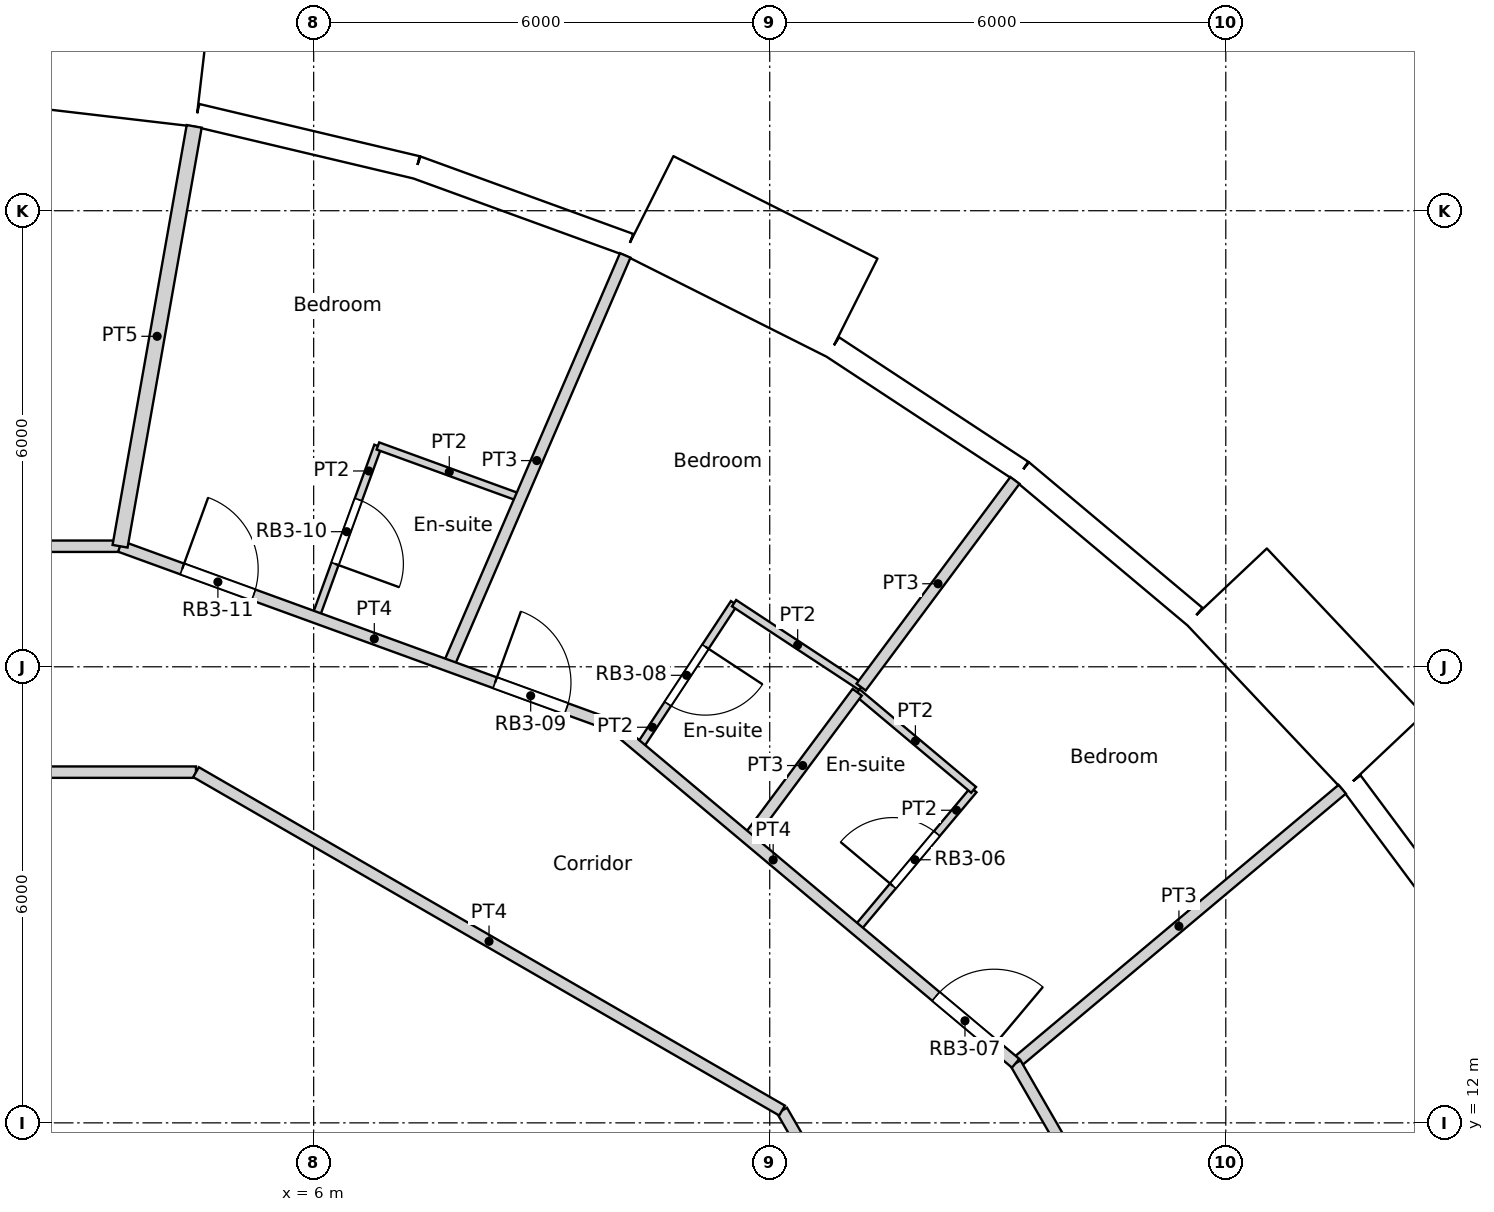
"""IFC4 building model, lengths in metres.
Left out: names, types, materials, properties, quantities, classifications, styles, units other than length and angle.
Written with IfcOpenShell. Run it as: python <this file> out.ifc"""

import sys

from ifc_helpers import new_model, si_unit, direction, frame, frame_2d, origin, origin_2d, place, context, subcontext, project, spatial, rectangle, circle, extrude, element, fill, save


model = new_model("IFC4")
c1 = context("Model", 3, precision=1e-05, world=origin(), true_north=direction((0.0, 1.0)))
c2 = subcontext(c1, "Body", "Model", "MODEL_VIEW")
j1 = project(units=[si_unit("LENGTHUNIT", "METRE"), si_unit("PLANEANGLEUNIT", "RADIAN")], contexts=[c1])
p1 = place(None, origin())
s1 = spatial("IfcSite", under=j1, at=p1, CompositionType="ELEMENT")
p2 = place(p1, origin())
s2 = spatial("IfcBuilding", under=s1, at=p2, CompositionType="ELEMENT")
p3 = place(p2, frame((0.0, 0.0, 147.6)))
s3 = spatial("IfcBuildingStorey", under=s2, at=p3, CompositionType="ELEMENT", Elevation=147.6)
for number, where, z_axis, x_axis in (
    (1, (18.805, 15.779, 0.0), (0.0, 0.0, 1.0), (1.0, 0.0, 0.0)),
    (2, (14.659, 19.69, 0.0), (0.0, 0.0, 1.0), (1.0, 0.0, 0.0)),
    (3, (9.723, 22.54, 0.0), (0.0, 0.0, 1.0), (1.0, 0.0, 0.0)),
    (4, (4.263, 24.175, 0.0), (0.0, 0.0, 1.0), (1.0, 0.0, 0.0)),
):
    element("IfcColumn", number, at=place(p3, frame(where, z_axis=z_axis, x_axis=x_axis)), inside=s3, PredefinedType="COLUMN", context=c2, shape_type="SweptSolid", body=[
        extrude(circle(Radius=0.6, at=origin_2d()), origin(), (0.0, 0.0, 1.0), 3.6),
    ])
for number, where, z_axis, x_axis in (
    (5, (11.735, 14.716, 0.0), (0.0, 0.0, 1.0), (1.0, 0.0, 0.0)),
    (6, (6.876, 17.521, 0.0), (0.0, 0.0, 1.0), (1.0, 0.0, 0.0)),
):
    element("IfcColumn", number, at=place(p3, frame(where, z_axis=z_axis, x_axis=x_axis)), inside=s3, PredefinedType="COLUMN", context=c2, shape_type="SweptSolid", body=[
        extrude(circle(Radius=0.65, at=origin_2d()), origin(), (0.0, 0.0, 1.0), 3.6),
    ])
p4 = place(p3, frame((21.428, 14.094, 0.0), z_axis=(0.0, 0.0, 1.0), x_axis=(-0.597197580538, 0.80209416517, 0.0)))
e7 = element("IfcWall", 7, at=p4, inside=s3, PredefinedType="SOLIDWALL", context=c2, shape_type="SweptSolid", body=[
    extrude(rectangle(XDim=2.973, YDim=0.3, at=frame_2d((1.486, 0.0))), origin(), (0.0, 0.0, 1.0), 3.3),
])
p5 = place(p4, frame((1.486, 0.0, 1.55)))
e8 = element("IfcOpeningElement", 8, at=p5, cuts=e7, PredefinedType="OPENING", context=c2, shape_type="SweptSolid", body=[
    extrude(circle(Radius=0.9, at=origin_2d()), frame((0.0, 0.16, 0.0), z_axis=(0.0, -1.0, 0.0), x_axis=(1.0, 0.0, 0.0)), (0.0, 0.0, 1.0), 0.32),
])
p6 = place(p3, frame((20.071, 16.874, -0.3), z_axis=(0.0, 0.0, 1.0), x_axis=(-0.686217177108, 0.727396718334, 0.0)))
e9 = element("IfcWall", 9, at=p6, inside=s3, PredefinedType="ELEMENTEDWALL", context=c2, shape_type="SweptSolid", body=[
    extrude(rectangle(XDim=3.0, YDim=1.45, at=frame_2d((1.5, 0.0))), origin(), (0.0, 0.0, 1.0), 3.6),
])
p7 = place(p6, frame((1.5, 0.0, 1.85)))
e10 = element("IfcOpeningElement", 10, at=p7, cuts=e9, PredefinedType="OPENING", context=c2, shape_type="SweptSolid", body=[
    extrude(circle(Radius=0.9, at=origin_2d()), frame((0.0, 0.735, 0.0), z_axis=(0.0, -1.0, 0.0), x_axis=(1.0, 0.0, 0.0)), (0.0, 0.0, 1.0), 1.47),
])
p8 = place(p3, frame((17.593, 18.661, 0.0), z_axis=(0.0, 0.0, 1.0), x_axis=(-0.766008913364, 0.642829950023, 0.0)))
e11 = element("IfcWall", 11, at=p8, inside=s3, PredefinedType="SOLIDWALL", context=c2, shape_type="SweptSolid", body=[
    extrude(rectangle(XDim=2.973, YDim=0.3, at=frame_2d((1.486, 0.0))), origin(), (0.0, 0.0, 1.0), 3.3),
])
p9 = place(p8, frame((1.486, 0.0, 1.55)))
e12 = element("IfcOpeningElement", 12, at=p9, cuts=e11, PredefinedType="OPENING", context=c2, shape_type="SweptSolid", body=[
    extrude(circle(Radius=0.9, at=origin_2d()), frame((0.0, 0.16, 0.0), z_axis=(0.0, -1.0, 0.0), x_axis=(1.0, 0.0, 0.0)), (0.0, 0.0, 1.0), 0.32),
])
p10 = place(p3, frame((15.316, 20.573, 0.0), z_axis=(0.0, 0.0, 1.0), x_axis=(-0.835508361394, 0.54947773207, 0.0)))
e13 = element("IfcWall", 13, at=p10, inside=s3, PredefinedType="SOLIDWALL", context=c2, shape_type="SweptSolid", body=[
    extrude(rectangle(XDim=2.973, YDim=0.3, at=frame_2d((1.486, 0.0))), origin(), (0.0, 0.0, 1.0), 3.3),
])
p11 = place(p10, frame((1.486, 0.0, 1.55)))
e14 = element("IfcOpeningElement", 14, at=p11, cuts=e13, PredefinedType="OPENING", context=c2, shape_type="SweptSolid", body=[
    extrude(circle(Radius=0.9, at=origin_2d()), frame((0.0, 0.16, 0.0), z_axis=(0.0, -1.0, 0.0), x_axis=(1.0, 0.0, 0.0)), (0.0, 0.0, 1.0), 0.32),
])
p12 = place(p3, frame((13.09, 22.721, -0.3), z_axis=(0.0, 0.0, 1.0), x_axis=(-0.893628249713, 0.448807922518, 0.0)))
e15 = element("IfcWall", 15, at=p12, inside=s3, PredefinedType="ELEMENTEDWALL", context=c2, shape_type="SweptSolid", body=[
    extrude(rectangle(XDim=3.0, YDim=1.45, at=frame_2d((1.5, 0.0))), origin(), (0.0, 0.0, 1.0), 3.6),
])
p13 = place(p12, frame((1.5, 0.0, 1.85)))
e16 = element("IfcOpeningElement", 16, at=p13, cuts=e15, PredefinedType="OPENING", context=c2, shape_type="SweptSolid", body=[
    extrude(circle(Radius=0.9, at=origin_2d()), frame((0.0, 0.735, 0.0), z_axis=(0.0, -1.0, 0.0), x_axis=(1.0, 0.0, 0.0)), (0.0, 0.0, 1.0), 1.47),
])
p14 = place(p3, frame((10.149, 23.553, 0.0), z_axis=(0.0, 0.0, 1.0), x_axis=(-0.939690282133, 0.342026568652, 0.0)))
e17 = element("IfcWall", 17, at=p14, inside=s3, PredefinedType="SOLIDWALL", context=c2, shape_type="SweptSolid", body=[
    extrude(rectangle(XDim=2.973, YDim=0.3, at=frame_2d((1.486, 0.0))), origin(), (0.0, 0.0, 1.0), 3.3),
])
p15 = place(p14, frame((1.486, 0.0, 1.55)))
e18 = element("IfcOpeningElement", 18, at=p15, cuts=e17, PredefinedType="OPENING", context=c2, shape_type="SweptSolid", body=[
    extrude(circle(Radius=0.9, at=origin_2d()), frame((0.0, 0.16, 0.0), z_axis=(0.0, -1.0, 0.0), x_axis=(1.0, 0.0, 0.0)), (0.0, 0.0, 1.0), 0.32),
])
p16 = place(p3, frame((7.356, 24.57, 0.0), z_axis=(0.0, 0.0, 1.0), x_axis=(-0.973045378923, 0.230613725862, 0.0)))
e19 = element("IfcWall", 19, at=p16, inside=s3, PredefinedType="SOLIDWALL", context=c2, shape_type="SweptSolid", body=[
    extrude(rectangle(XDim=2.973, YDim=0.3, at=frame_2d((1.486, 0.0))), origin(), (0.0, 0.0, 1.0), 3.3),
])
p17 = place(p16, frame((1.486, 0.0, 1.55)))
e20 = element("IfcOpeningElement", 20, at=p17, cuts=e19, PredefinedType="OPENING", context=c2, shape_type="SweptSolid", body=[
    extrude(circle(Radius=0.9, at=origin_2d()), frame((0.0, 0.16, 0.0), z_axis=(0.0, -1.0, 0.0), x_axis=(1.0, 0.0, 0.0)), (0.0, 0.0, 1.0), 0.32),
])
p18 = place(p3, frame((4.529, 25.828, -0.3), z_axis=(0.0, 0.0, 1.0), x_axis=(-0.9932342274, 0.116128246006, 0.0)))
e21 = element("IfcWall", 21, at=p18, inside=s3, PredefinedType="ELEMENTEDWALL", context=c2, shape_type="SweptSolid", body=[
    extrude(rectangle(XDim=3.0, YDim=1.45, at=frame_2d((1.5, 0.0))), origin(), (0.0, 0.0, 1.0), 3.6),
])
p19 = place(p18, frame((1.5, 0.0, 1.85)))
e22 = element("IfcOpeningElement", 22, at=p19, cuts=e21, PredefinedType="OPENING", context=c2, shape_type="SweptSolid", body=[
    extrude(circle(Radius=0.9, at=origin_2d()), frame((0.0, 0.735, 0.0), z_axis=(0.0, -1.0, 0.0), x_axis=(1.0, 0.0, 0.0)), (0.0, 0.0, 1.0), 1.47),
])
p20 = place(p3, frame((12.162, 12.162, 0.0), z_axis=(0.0, 0.0, 1.0), x_axis=(0.499961633463, -0.866047553582, 0.0)))
e23 = element("IfcWall", 23, at=p20, inside=s3, PredefinedType="PARTITIONING", context=c2, shape_type="SweptSolid", body=[
    extrude(rectangle(XDim=2.15, YDim=0.15, at=frame_2d((1.075, 0.0))), origin(), (0.0, 0.0, 1.0), 3.3),
])
p21 = place(p3, frame((15.235, 12.784, 0.0), z_axis=(0.0, 0.0, 1.0), x_axis=(0.499914202267, -0.866074933462, 0.0)))
e24 = element("IfcWall", 24, at=p21, inside=s3, PredefinedType="PARTITIONING", context=c2, shape_type="SweptSolid", body=[
    extrude(rectangle(XDim=6.907, YDim=0.15, at=frame_2d((3.454, 0.0))), origin(), (0.0, 0.0, 1.0), 3.3),
])
p22 = place(p21, frame((3.004, 0.0, 0.0)))
e25 = element("IfcOpeningElement", 25, at=p22, cuts=e24, PredefinedType="OPENING", context=c2, shape_type="SweptSolid", body=[
    extrude(rectangle(XDim=1.8, YDim=2.1, at=frame_2d((0.9, 1.05))), frame((0.0, 0.075, 0.0), z_axis=(0.0, -1.0, 0.0), x_axis=(1.0, 0.0, 0.0)), (0.0, 0.0, 1.0), 0.15),
])
p23 = place(p3, frame((9.943, 17.222, 0.0), z_axis=(0.0, 0.0, 1.0), x_axis=(0.766192104565, -0.642611592567, 0.0)))
e26 = element("IfcWall", 26, at=p23, inside=s3, PredefinedType="PARTITIONING", context=c2, shape_type="SweptSolid", body=[
    extrude(rectangle(XDim=6.906, YDim=0.15, at=frame_2d((3.453, 0.0))), origin(), (0.0, 0.0, 1.0), 3.3),
])
p24 = place(p23, frame((5.537, 0.0, 0.0)))
e27 = element("IfcOpeningElement", 27, at=p24, cuts=e26, PredefinedType="OPENING", context=c2, shape_type="SweptSolid", body=[
    extrude(rectangle(XDim=1.0, YDim=2.1, at=frame_2d((0.5, 1.05))), frame((0.0, 0.075, 0.0), z_axis=(0.0, -1.0, 0.0), x_axis=(1.0, 0.0, 0.0)), (0.0, 0.0, 1.0), 0.15),
])
p25 = place(p3, frame((4.452, 16.614, 0.0), z_axis=(0.0, 0.0, 1.0), x_axis=(0.866005203721, -0.500034985904, 0.0)))
e28 = element("IfcWall", 28, at=p25, inside=s3, PredefinedType="PARTITIONING", context=c2, shape_type="SweptSolid", body=[
    extrude(rectangle(XDim=8.903, YDim=0.15, at=frame_2d((4.452, 0.0))), origin(), (0.0, 0.0, 1.0), 3.3),
])
p26 = place(p3, frame((-3.021, 16.614, 0.0), z_axis=(0.0, 0.0, 1.0), x_axis=(1.0, 0.0, 0.0)))
e29 = element("IfcWall", 29, at=p26, inside=s3, PredefinedType="PARTITIONING", context=c2, shape_type="SweptSolid", body=[
    extrude(rectangle(XDim=7.473, YDim=0.15, at=frame_2d((3.736, 0.0))), origin(), (0.0, 0.0, 1.0), 3.3),
])
p27 = place(p3, frame((3.452, 19.585, 0.0), z_axis=(0.0, 0.0, 1.0), x_axis=(0.939737689664, -0.341896292208, 0.0)))
e30 = element("IfcWall", 30, at=p27, inside=s3, PredefinedType="PARTITIONING", context=c2, shape_type="SweptSolid", body=[
    extrude(rectangle(XDim=6.908, YDim=0.15, at=frame_2d((3.454, 0.0))), origin(), (0.0, 0.0, 1.0), 3.3),
])
p28 = place(p27, frame((5.249, 0.0, 0.0)))
e31 = element("IfcOpeningElement", 31, at=p28, cuts=e30, PredefinedType="OPENING", context=c2, shape_type="SweptSolid", body=[
    extrude(rectangle(XDim=1.0, YDim=2.1, at=frame_2d((0.5, 1.05))), frame((0.0, 0.075, 0.0), z_axis=(0.0, -1.0, 0.0), x_axis=(1.0, 0.0, 0.0)), (0.0, 0.0, 1.0), 0.15),
])
p29 = place(p27, frame((0.87, 0.0, 0.0)))
e32 = element("IfcOpeningElement", 32, at=p29, cuts=e30, PredefinedType="OPENING", context=c2, shape_type="SweptSolid", body=[
    extrude(rectangle(XDim=1.0, YDim=2.1, at=frame_2d((0.5, 1.05))), frame((0.0, 0.075, 0.0), z_axis=(0.0, -1.0, 0.0), x_axis=(1.0, 0.0, 0.0)), (0.0, 0.0, 1.0), 0.15),
])
p30 = place(p3, frame((-3.453, 19.586, 0.0), z_axis=(0.0, 0.0, 1.0), x_axis=(1.0, 0.0, 0.0)))
e33 = element("IfcWall", 33, at=p30, inside=s3, PredefinedType="PARTITIONING", context=c2, shape_type="SweptSolid", body=[
    extrude(rectangle(XDim=6.906, YDim=0.15, at=frame_2d((3.453, 0.0))), origin(), (0.0, 0.0, 1.0), 3.3),
])
p31 = place(p3, frame((15.235, 12.784, 0.0), z_axis=(0.0, 0.0, 1.0), x_axis=(0.76609059793, 0.642732600514, 0.0)))
e34 = element("IfcWall", 34, at=p31, inside=s3, PredefinedType="PARTITIONING", context=c2, shape_type="SweptSolid", body=[
    extrude(rectangle(XDim=5.609, YDim=0.15, at=frame_2d((2.804, 0.0))), origin(), (0.0, 0.0, 1.0), 3.3),
])
p32 = place(p3, frame((13.139, 14.542, 0.0), z_axis=(0.0, 0.0, 1.0), x_axis=(0.642731657745, 0.766091388891, 0.0)))
e35 = element("IfcWall", 35, at=p32, inside=s3, PredefinedType="PARTITIONING", context=c2, shape_type="SweptSolid", body=[
    extrude(rectangle(XDim=2.401, YDim=0.1, at=frame_2d((1.2, 0.0))), origin(), (0.0, 0.0, 1.0), 3.3),
])
p33 = place(p32, frame((0.75, 0.0, 0.0)))
e36 = element("IfcOpeningElement", 36, at=p33, cuts=e35, PredefinedType="OPENING", context=c2, shape_type="SweptSolid", body=[
    extrude(rectangle(XDim=0.9, YDim=2.04, at=frame_2d((0.45, 1.02))), frame((0.0, 0.05, 0.0), z_axis=(0.0, -1.0, 0.0), x_axis=(1.0, 0.0, 0.0)), (0.0, 0.0, 1.0), 0.1),
])
p34 = place(p3, frame((13.151, 17.665, 0.0), z_axis=(0.0, 0.0, 1.0), x_axis=(0.766224532916, -0.642572925945, 0.0)))
e37 = element("IfcWall", 37, at=p34, inside=s3, PredefinedType="PARTITIONING", context=c2, shape_type="SweptSolid", body=[
    extrude(rectangle(XDim=1.998, YDim=0.1, at=frame_2d((0.999, 0.0))), origin(), (0.0, 0.0, 1.0), 3.3),
])
p35 = place(p3, frame((13.202, 17.733, 0.0), z_axis=(0.0, 0.0, 1.0), x_axis=(0.597149819296, 0.802129723495, 0.0)))
e38 = element("IfcWall", 38, at=p35, inside=s3, PredefinedType="PARTITIONING", context=c2, shape_type="SweptSolid", body=[
    extrude(rectangle(XDim=3.39, YDim=0.15, at=frame_2d((1.695, 0.0))), origin(), (0.0, 0.0, 1.0), 3.3),
])
p36 = place(p3, frame((11.716, 15.737, 0.0), z_axis=(0.0, 0.0, 1.0), x_axis=(0.597021412293, 0.802225300813, 0.0)))
e39 = element("IfcWall", 39, at=p36, inside=s3, PredefinedType="PARTITIONING", context=c2, shape_type="SweptSolid", body=[
    extrude(rectangle(XDim=2.403, YDim=0.15, at=frame_2d((1.202, 0.0))), origin(), (0.0, 0.0, 1.0), 3.3),
])
p37 = place(p3, frame((11.531, 18.837, 0.0), z_axis=(0.0, 0.0, 1.0), x_axis=(0.835392041163, -0.549654562032, 0.0)))
e40 = element("IfcWall", 40, at=p37, inside=s3, PredefinedType="PARTITIONING", context=c2, shape_type="SweptSolid", body=[
    extrude(rectangle(XDim=2.003, YDim=0.1, at=frame_2d((1.001, 0.0))), origin(), (0.0, 0.0, 1.0), 3.3),
])
p38 = place(p3, frame((10.282, 16.939, 0.0), z_axis=(0.0, 0.0, 1.0), x_axis=(0.549730960803, 0.83534176882, 0.0)))
e41 = element("IfcWall", 41, at=p38, inside=s3, PredefinedType="PARTITIONING", context=c2, shape_type="SweptSolid", body=[
    extrude(rectangle(XDim=2.272, YDim=0.1, at=frame_2d((1.136, 0.0))), origin(), (0.0, 0.0, 1.0), 3.3),
])
p39 = place(p38, frame((0.686, 0.0, 0.0)))
e42 = element("IfcOpeningElement", 42, at=p39, cuts=e41, PredefinedType="OPENING", context=c2, shape_type="SweptSolid", body=[
    extrude(rectangle(XDim=0.9, YDim=2.04, at=frame_2d((0.45, 1.02))), frame((0.0, 0.05, 0.0), z_axis=(0.0, -1.0, 0.0), x_axis=(1.0, 0.0, 0.0)), (0.0, 0.0, 1.0), 0.1),
])
p40 = place(p3, frame((7.772, 18.014, 0.0), z_axis=(0.0, 0.0, 1.0), x_axis=(0.395898183585, 0.918294412612, 0.0)))
e43 = element("IfcWall", 43, at=p40, inside=s3, PredefinedType="PARTITIONING", context=c2, shape_type="SweptSolid", body=[
    extrude(rectangle(XDim=5.879, YDim=0.15, at=frame_2d((2.939, 0.0))), origin(), (0.0, 0.0, 1.0), 3.3),
])
p41 = place(p3, frame((6.845, 20.905, 0.0), z_axis=(0.0, 0.0, 1.0), x_axis=(0.939757747305, -0.341841156651, 0.0)))
e44 = element("IfcWall", 44, at=p41, inside=s3, PredefinedType="PARTITIONING", context=c2, shape_type="SweptSolid", body=[
    extrude(rectangle(XDim=1.998, YDim=0.1, at=frame_2d((0.999, 0.0))), origin(), (0.0, 0.0, 1.0), 3.3),
])
p42 = place(p3, frame((6.024, 18.65, 0.0), z_axis=(0.0, 0.0, 1.0), x_axis=(0.342110593602, 0.939659694648, 0.0)))
e45 = element("IfcWall", 45, at=p42, inside=s3, PredefinedType="PARTITIONING", context=c2, shape_type="SweptSolid", body=[
    extrude(rectangle(XDim=2.4, YDim=0.1, at=frame_2d((1.2, 0.0))), origin(), (0.0, 0.0, 1.0), 3.3),
])
p43 = place(p42, frame((0.75, 0.0, 0.0)))
e46 = element("IfcOpeningElement", 46, at=p43, cuts=e45, PredefinedType="OPENING", context=c2, shape_type="SweptSolid", body=[
    extrude(rectangle(XDim=0.9, YDim=2.04, at=frame_2d((0.45, 1.02))), frame((0.0, 0.05, 0.0), z_axis=(0.0, -1.0, 0.0), x_axis=(1.0, 0.0, 0.0)), (0.0, 0.0, 1.0), 0.1),
])
p44 = place(p3, frame((3.453, 19.586, 0.0), z_axis=(0.0, 0.0, 1.0), x_axis=(0.17382754149, 0.984776109489, 0.0)))
e47 = element("IfcWall", 47, at=p44, inside=s3, PredefinedType="PARTITIONING", context=c2, shape_type="SweptSolid", body=[
    extrude(rectangle(XDim=5.61, YDim=0.2, at=frame_2d((2.805, 0.0))), origin(), (0.0, 0.0, 1.0), 3.3),
])
p45 = place(p5, origin())
e48 = element("IfcWindow", 48, at=p45, inside=s3, PartitioningType="SINGLE_PANEL", PredefinedType="WINDOW", context=c2, shape_type="SweptSolid", body=[
    extrude(circle(Radius=0.9, at=origin_2d()), frame((0.0, 0.12, 0.0), z_axis=(0.0, -1.0, 0.0), x_axis=(1.0, 0.0, 0.0)), (0.0, 0.0, 1.0), 0.1),
])
fill(e8, e48)
p46 = place(p7, origin())
e49 = element("IfcWindow", 49, at=p46, inside=s3, PartitioningType="SINGLE_PANEL", PredefinedType="WINDOW", context=c2, shape_type="SweptSolid", body=[
    extrude(circle(Radius=0.9, at=origin_2d()), frame((0.0, 0.695, 0.0), z_axis=(0.0, -1.0, 0.0), x_axis=(1.0, 0.0, 0.0)), (0.0, 0.0, 1.0), 0.1),
])
fill(e10, e49)
p47 = place(p9, origin())
e50 = element("IfcWindow", 50, at=p47, inside=s3, PartitioningType="SINGLE_PANEL", PredefinedType="WINDOW", context=c2, shape_type="SweptSolid", body=[
    extrude(circle(Radius=0.9, at=origin_2d()), frame((0.0, 0.12, 0.0), z_axis=(0.0, -1.0, 0.0), x_axis=(1.0, 0.0, 0.0)), (0.0, 0.0, 1.0), 0.1),
])
fill(e12, e50)
p48 = place(p11, origin())
e51 = element("IfcWindow", 51, at=p48, inside=s3, PartitioningType="SINGLE_PANEL", PredefinedType="WINDOW", context=c2, shape_type="SweptSolid", body=[
    extrude(circle(Radius=0.9, at=origin_2d()), frame((0.0, 0.12, 0.0), z_axis=(0.0, -1.0, 0.0), x_axis=(1.0, 0.0, 0.0)), (0.0, 0.0, 1.0), 0.1),
])
fill(e14, e51)
p49 = place(p13, origin())
e52 = element("IfcWindow", 52, at=p49, inside=s3, PartitioningType="SINGLE_PANEL", PredefinedType="WINDOW", context=c2, shape_type="SweptSolid", body=[
    extrude(circle(Radius=0.9, at=origin_2d()), frame((0.0, 0.695, 0.0), z_axis=(0.0, -1.0, 0.0), x_axis=(1.0, 0.0, 0.0)), (0.0, 0.0, 1.0), 0.1),
])
fill(e16, e52)
p50 = place(p15, origin())
e53 = element("IfcWindow", 53, at=p50, inside=s3, PartitioningType="SINGLE_PANEL", PredefinedType="WINDOW", context=c2, shape_type="SweptSolid", body=[
    extrude(circle(Radius=0.9, at=origin_2d()), frame((0.0, 0.12, 0.0), z_axis=(0.0, -1.0, 0.0), x_axis=(1.0, 0.0, 0.0)), (0.0, 0.0, 1.0), 0.1),
])
fill(e18, e53)
p51 = place(p17, origin())
e54 = element("IfcWindow", 54, at=p51, inside=s3, PartitioningType="SINGLE_PANEL", PredefinedType="WINDOW", context=c2, shape_type="SweptSolid", body=[
    extrude(circle(Radius=0.9, at=origin_2d()), frame((0.0, 0.12, 0.0), z_axis=(0.0, -1.0, 0.0), x_axis=(1.0, 0.0, 0.0)), (0.0, 0.0, 1.0), 0.1),
])
fill(e20, e54)
p52 = place(p19, origin())
e55 = element("IfcWindow", 55, at=p52, inside=s3, PartitioningType="SINGLE_PANEL", PredefinedType="WINDOW", context=c2, shape_type="SweptSolid", body=[
    extrude(circle(Radius=0.9, at=origin_2d()), frame((0.0, 0.695, 0.0), z_axis=(0.0, -1.0, 0.0), x_axis=(1.0, 0.0, 0.0)), (0.0, 0.0, 1.0), 0.1),
])
fill(e22, e55)
p53 = place(p33, origin())
e56 = element("IfcDoor", 56, at=p53, inside=s3, OperationType="SINGLE_SWING_LEFT", PredefinedType="DOOR", context=c2, shape_type="SweptSolid", body=[
    extrude(rectangle(XDim=0.9, YDim=2.04, at=frame_2d((0.45, 1.02))), frame((0.0, 0.025, 0.0), z_axis=(0.0, -1.0, 0.0), x_axis=(1.0, 0.0, 0.0)), (0.0, 0.0, 1.0), 0.05),
])
fill(e36, e56)
p54 = place(p24, origin())
e57 = element("IfcDoor", 57, at=p54, inside=s3, OperationType="SINGLE_SWING_RIGHT", PredefinedType="DOOR", context=c2, shape_type="SweptSolid", body=[
    extrude(rectangle(XDim=1.0, YDim=2.1, at=frame_2d((0.5, 1.05))), frame((0.0, 0.025, 0.0), z_axis=(0.0, -1.0, 0.0), x_axis=(1.0, 0.0, 0.0)), (0.0, 0.0, 1.0), 0.05),
])
fill(e27, e57)
p55 = place(p39, origin())
e58 = element("IfcDoor", 58, at=p55, inside=s3, OperationType="SINGLE_SWING_LEFT", PredefinedType="DOOR", context=c2, shape_type="SweptSolid", body=[
    extrude(rectangle(XDim=0.9, YDim=2.04, at=frame_2d((0.45, 1.02))), frame((0.0, 0.025, 0.0), z_axis=(0.0, -1.0, 0.0), x_axis=(1.0, 0.0, 0.0)), (0.0, 0.0, 1.0), 0.05),
])
fill(e42, e58)
p56 = place(p28, origin())
e59 = element("IfcDoor", 59, at=p56, inside=s3, OperationType="SINGLE_SWING_LEFT", PredefinedType="DOOR", context=c2, shape_type="SweptSolid", body=[
    extrude(rectangle(XDim=1.0, YDim=2.1, at=frame_2d((0.5, 1.05))), frame((0.0, 0.025, 0.0), z_axis=(0.0, -1.0, 0.0), x_axis=(1.0, 0.0, 0.0)), (0.0, 0.0, 1.0), 0.05),
])
fill(e31, e59)
p57 = place(p43, origin())
e60 = element("IfcDoor", 60, at=p57, inside=s3, OperationType="SINGLE_SWING_RIGHT", PredefinedType="DOOR", context=c2, shape_type="SweptSolid", body=[
    extrude(rectangle(XDim=0.9, YDim=2.04, at=frame_2d((0.45, 1.02))), frame((0.0, 0.025, 0.0), z_axis=(0.0, -1.0, 0.0), x_axis=(1.0, 0.0, 0.0)), (0.0, 0.0, 1.0), 0.05),
])
fill(e46, e60)
p58 = place(p29, origin())
e61 = element("IfcDoor", 61, at=p58, inside=s3, OperationType="SINGLE_SWING_LEFT", PredefinedType="DOOR", context=c2, shape_type="SweptSolid", body=[
    extrude(rectangle(XDim=1.0, YDim=2.1, at=frame_2d((0.5, 1.05))), frame((0.0, 0.025, 0.0), z_axis=(0.0, -1.0, 0.0), x_axis=(1.0, 0.0, 0.0)), (0.0, 0.0, 1.0), 0.05),
])
fill(e32, e61)
save(model, sys.argv[1])
